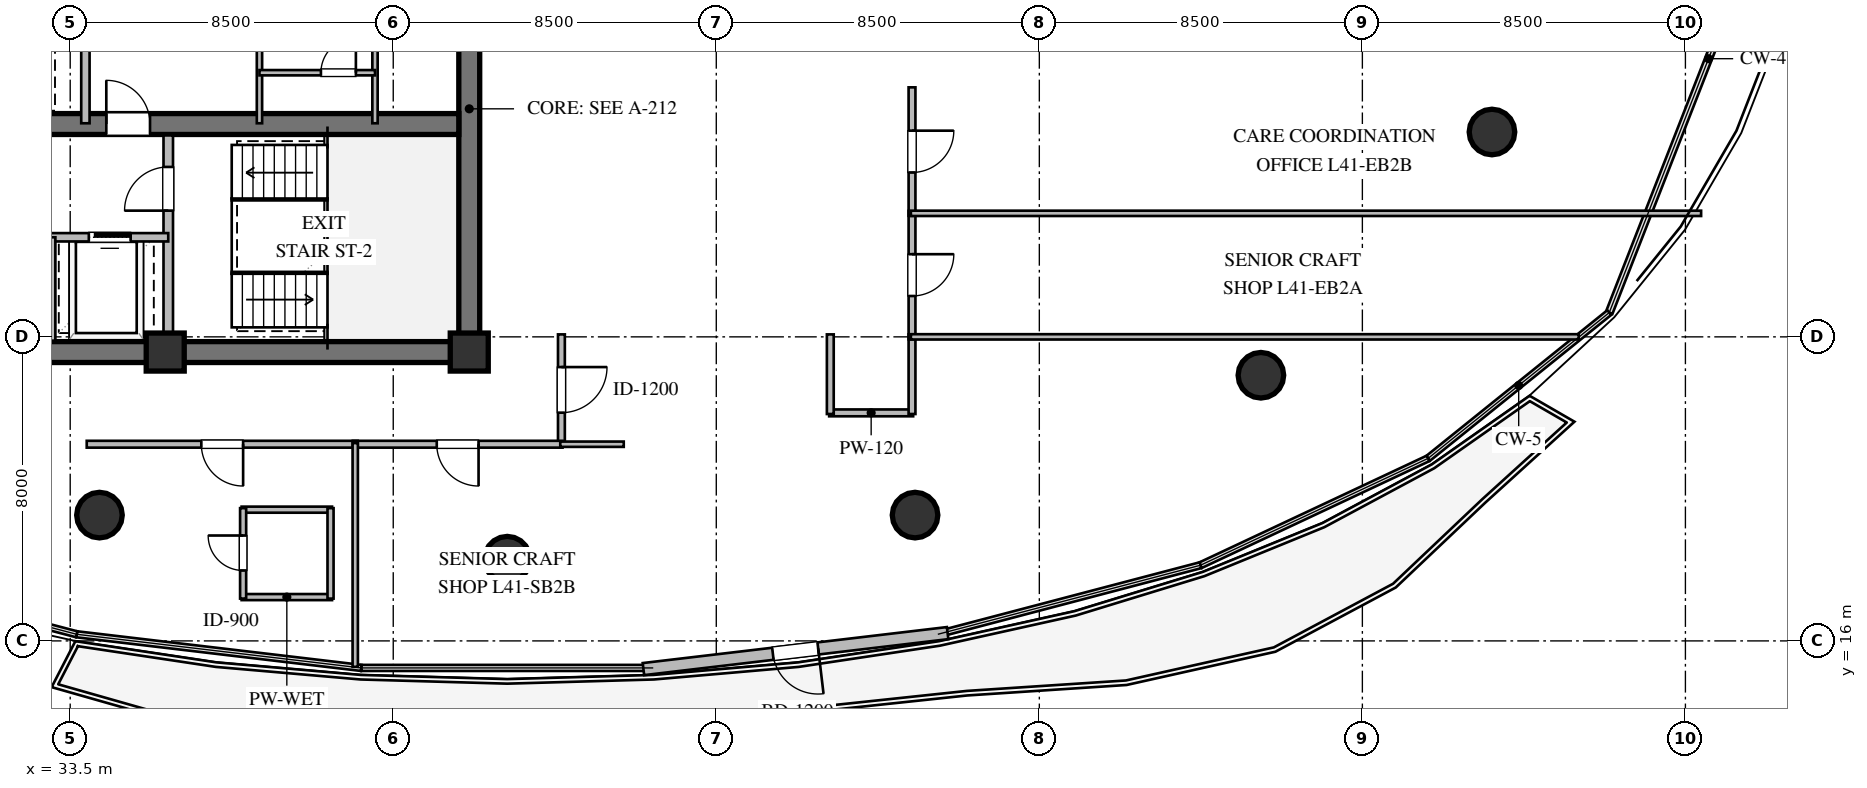
"""IFC4 building model, lengths in metres.
Left out: names, types, materials, properties, quantities, classifications, styles, units other than length and angle.
Written with IfcOpenShell. Run it as: python <this file> out.ifc"""

import sys

from ifc_helpers import new_model, si_unit, direction, frame, frame_2d, origin, origin_2d, place, context, subcontext, project, spatial, rectangle, circle, extrude, element, fill, save


model = new_model("IFC4")
c1 = context("Model", 3, precision=1e-05, world=origin(), true_north=direction((0.0, 1.0)))
c2 = subcontext(c1, "Body", "Model", "MODEL_VIEW")
j1 = project(units=[si_unit("LENGTHUNIT", "METRE"), si_unit("PLANEANGLEUNIT", "RADIAN")], contexts=[c1])
p1 = place(None, origin())
s1 = spatial("IfcSite", under=j1, at=p1, CompositionType="ELEMENT")
p2 = place(p1, origin())
s2 = spatial("IfcBuilding", under=s1, at=p2, CompositionType="ELEMENT")
p3 = place(p2, frame((0.0, 0.0, 156.6)))
s3 = spatial("IfcBuildingStorey", under=s2, at=p3, CompositionType="ELEMENT", Elevation=156.6)
p4 = place(p3, frame((21.725, 23.6, 0.0), z_axis=(0.0, 0.0, 1.0), x_axis=(1.0, 0.0, 0.0)))
e1 = element("IfcWall", 1, at=p4, inside=s3, PredefinedType="SHEAR", context=c2, shape_type="SweptSolid", body=[
    extrude(rectangle(XDim=22.55, YDim=0.55, at=frame_2d((11.275, 0.0))), origin(), (0.0, 0.0, 1.0), 3.36),
])
p5 = place(p3, frame((44.0, 23.875, 0.0), z_axis=(0.0, 0.0, 1.0), x_axis=(0.0, 1.0, 0.0)))
e2 = element("IfcWall", 2, at=p5, inside=s3, PredefinedType="SHEAR", context=c2, shape_type="SweptSolid", body=[
    extrude(rectangle(XDim=12.25, YDim=0.55, at=frame_2d((6.125, 0.0))), origin(), (0.0, 0.0, 1.0), 3.36),
])
p6 = place(p5, frame((8.725, 0.0, 0.0)))
e3 = element("IfcOpeningElement", 3, at=p6, cuts=e2, PredefinedType="OPENING", context=c2, shape_type="SweptSolid", body=[
    extrude(rectangle(XDim=1.5, YDim=2.15, at=frame_2d((0.75, 1.075))), frame((0.0, 0.285, 0.0), z_axis=(0.0, -1.0, 0.0), x_axis=(1.0, 0.0, 0.0)), (0.0, 0.0, 1.0), 0.57),
])
p7 = place(p3, frame((22.275, 29.6, 0.0), z_axis=(0.0, 0.0, 1.0), x_axis=(1.0, 0.0, 0.0)))
e4 = element("IfcWall", 4, at=p7, inside=s3, PredefinedType="SHEAR", context=c2, shape_type="SweptSolid", body=[
    extrude(rectangle(XDim=21.45, YDim=0.55, at=frame_2d((10.725, 0.0))), origin(), (0.0, 0.0, 1.0), 3.36),
])
p8 = place(p7, frame((12.175, 0.0, 0.0)))
e5 = element("IfcOpeningElement", 5, at=p8, cuts=e4, PredefinedType="OPENING", context=c2, shape_type="SweptSolid", body=[
    extrude(rectangle(XDim=1.15, YDim=2.1, at=frame_2d((0.575, 1.05))), frame((0.0, 0.285, 0.0), z_axis=(0.0, -1.0, 0.0), x_axis=(1.0, 0.0, 0.0)), (0.0, 0.0, 1.0), 0.57),
])
for number, where, z_axis, x_axis in (
    (6, (36.0, 23.6, 0.0), (0.0, 0.0, 1.0), (1.0, 0.0, 0.0)),
    (7, (44.0, 23.6, 0.0), (0.0, 0.0, 1.0), (1.0, 0.0, 0.0)),
):
    element("IfcColumn", number, at=place(p3, frame(where, z_axis=z_axis, x_axis=x_axis)), inside=s3, PredefinedType="COLUMN", context=c2, shape_type="SweptSolid", body=[
        extrude(rectangle(XDim=1.0, YDim=1.0, at=origin_2d()), origin(), (0.0, 0.0, 1.0), 3.6),
    ])
for number, where, z_axis, x_axis in (
    (8, (34.27, 19.31, 0.0), (0.0, 0.0, 1.0), (1.0, 0.0, 0.0)),
    (9, (45.0, 18.15, 0.0), (0.0, 0.0, 1.0), (1.0, 0.0, 0.0)),
    (10, (55.73, 19.31, 0.0), (0.0, 0.0, 1.0), (1.0, 0.0, 0.0)),
    (11, (64.83, 22.99, 0.0), (0.0, 0.0, 1.0), (1.0, 0.0, 0.0)),
    (12, (70.91, 29.39, 0.0), (0.0, 0.0, 1.0), (1.0, 0.0, 0.0)),
):
    element("IfcColumn", number, at=place(p3, frame(where, z_axis=z_axis, x_axis=x_axis)), inside=s3, PredefinedType="COLUMN", context=c2, shape_type="SweptSolid", body=[
        extrude(circle(Radius=0.6, at=origin_2d()), origin(), (0.0, 0.0, 1.0), 3.6),
    ])
p9 = place(p3, frame((56.587, 16.205, 0.0), z_axis=(0.0, 0.0, 1.0), x_axis=(-0.993072847957, -0.117500292131, 0.0)))
e13 = element("IfcWall", 13, at=p9, inside=s3, PredefinedType="STANDARD", context=c2, shape_type="SweptSolid", body=[
    extrude(rectangle(XDim=8.06, YDim=0.32, at=frame_2d((4.03, 0.0))), origin(), (0.0, 0.0, 1.0), 3.36),
])
p10 = place(p9, frame((3.43, 0.0, 0.0)))
e14 = element("IfcOpeningElement", 14, at=p10, cuts=e13, PredefinedType="OPENING", context=c2, shape_type="SweptSolid", body=[
    extrude(rectangle(XDim=1.2, YDim=2.15, at=frame_2d((0.6, 1.075))), frame((0.0, 0.17, 0.0), z_axis=(0.0, -1.0, 0.0), x_axis=(1.0, 0.0, 0.0)), (0.0, 0.0, 1.0), 0.34),
])
p11 = place(p3, frame((36.08, 23.9, 0.0), z_axis=(0.0, 0.0, 1.0), x_axis=(0.0, 1.0, 0.0)))
e15 = element("IfcWall", 15, at=p11, inside=s3, PredefinedType="SOLIDWALL", context=c2, shape_type="SweptSolid", body=[
    extrude(rectangle(XDim=5.4, YDim=0.25, at=frame_2d((2.7, 0.0))), origin(), (0.0, 0.0, 1.0), 3.36),
])
p12 = place(p11, frame((3.421, 0.0, 0.0)))
e16 = element("IfcOpeningElement", 16, at=p12, cuts=e15, PredefinedType="OPENING", context=c2, shape_type="SweptSolid", body=[
    extrude(rectangle(XDim=1.15, YDim=2.1, at=frame_2d((0.575, 1.05))), frame((0.0, 0.135, 0.0), z_axis=(0.0, -1.0, 0.0), x_axis=(1.0, 0.0, 0.0)), (0.0, 0.0, 1.0), 0.27),
])
p13 = place(p3, frame((29.92, 26.62, 0.0), z_axis=(0.0, 0.0, 1.0), x_axis=(1.0, 0.0, 0.0)))
e17 = element("IfcWall", 17, at=p13, inside=s3, PredefinedType="SOLIDWALL", context=c2, shape_type="SweptSolid", body=[
    extrude(rectangle(XDim=6.16, YDim=0.22, at=frame_2d((3.08, 0.0))), origin(), (0.0, 0.0, 1.0), 3.36),
])
p14 = place(p13, frame((0.99, 0.0, 0.0)))
e18 = element("IfcOpeningElement", 18, at=p14, cuts=e17, PredefinedType="OPENING", context=c2, shape_type="SweptSolid", body=[
    extrude(rectangle(XDim=1.1, YDim=2.1, at=frame_2d((0.55, 1.05))), frame((0.0, 0.12, 0.0), z_axis=(0.0, -1.0, 0.0), x_axis=(1.0, 0.0, 0.0)), (0.0, 0.0, 1.0), 0.24),
])
p15 = place(p13, frame((4.07, 0.0, 0.0)))
e19 = element("IfcOpeningElement", 19, at=p15, cuts=e17, PredefinedType="OPENING", context=c2, shape_type="SweptSolid", body=[
    extrude(rectangle(XDim=1.1, YDim=2.1, at=frame_2d((0.55, 1.05))), frame((0.0, 0.12, 0.0), z_axis=(0.0, -1.0, 0.0), x_axis=(1.0, 0.0, 0.0)), (0.0, 0.0, 1.0), 0.24),
])
p16 = place(p3, frame((33.0, 23.9, 0.0), z_axis=(0.0, 0.0, 1.0), x_axis=(0.0, 1.0, 0.0)))
e20 = element("IfcWall", 20, at=p16, inside=s3, PredefinedType="SOLIDWALL", context=c2, shape_type="SweptSolid", body=[
    extrude(rectangle(XDim=2.72, YDim=0.22, at=frame_2d((1.36, 0.0))), origin(), (0.0, 0.0, 1.0), 3.36),
])
p17 = place(p3, frame((33.9, 29.62, 0.0), z_axis=(0.0, 0.0, 1.0), x_axis=(0.0, 1.0, 0.0)))
e21 = element("IfcWall", 21, at=p17, inside=s3, PredefinedType="SOLIDWALL", context=c2, shape_type="SweptSolid", body=[
    extrude(rectangle(XDim=2.36, YDim=0.22, at=frame_2d((1.18, 0.0))), origin(), (0.0, 0.0, 1.0), 3.36),
])
for number, where, z_axis, x_axis in (
    (22, (38.48, 29.62, 0.0), (0.0, 0.0, 1.0), (0.0, 1.0, 0.0)),
    (23, (41.52, 29.62, 0.0), (0.0, 0.0, 1.0), (0.0, 1.0, 0.0)),
):
    element("IfcWall", number, at=place(p3, frame(where, z_axis=z_axis, x_axis=x_axis)), inside=s3, PredefinedType="PARTITIONING", context=c2, shape_type="SweptSolid", body=[
        extrude(rectangle(XDim=2.36, YDim=0.14, at=frame_2d((1.18, 0.0))), origin(), (0.0, 0.0, 1.0), 3.36),
    ])
p18 = place(p3, frame((38.48, 30.95, 0.0), z_axis=(0.0, 0.0, 1.0), x_axis=(1.0, 0.0, 0.0)))
e24 = element("IfcWall", 24, at=p18, inside=s3, PredefinedType="PARTITIONING", context=c2, shape_type="SweptSolid", body=[
    extrude(rectangle(XDim=3.04, YDim=0.14, at=frame_2d((1.52, 0.0))), origin(), (0.0, 0.0, 1.0), 3.36),
])
p19 = place(p18, frame((1.617, 0.0, 0.0)))
e25 = element("IfcOpeningElement", 25, at=p19, cuts=e24, PredefinedType="OPENING", context=c2, shape_type="SweptSolid", body=[
    extrude(rectangle(XDim=0.92, YDim=2.1, at=frame_2d((0.46, 1.05))), frame((0.0, 0.08, 0.0), z_axis=(0.0, -1.0, 0.0), x_axis=(1.0, 0.0, 0.0)), (0.0, 0.0, 1.0), 0.16),
])
p20 = place(p3, frame((38.01, 17.153, 0.0), z_axis=(0.0, 0.0, 1.0), x_axis=(1.0, 0.0, 0.0)))
e26 = element("IfcWall", 26, at=p20, inside=s3, PredefinedType="PLUMBINGWALL", context=c2, shape_type="SweptSolid", body=[
    extrude(rectangle(XDim=2.38, YDim=0.16, at=frame_2d((1.19, 0.0))), origin(), (0.0, 0.0, 1.0), 3.36),
])
p21 = place(p3, frame((38.01, 19.453, 0.0), z_axis=(0.0, 0.0, 1.0), x_axis=(1.0, 0.0, 0.0)))
e27 = element("IfcWall", 27, at=p21, inside=s3, PredefinedType="PLUMBINGWALL", context=c2, shape_type="SweptSolid", body=[
    extrude(rectangle(XDim=2.38, YDim=0.16, at=frame_2d((1.19, 0.0))), origin(), (0.0, 0.0, 1.0), 2.657),
])
p22 = place(p3, frame((38.05, 17.113, 0.0), z_axis=(0.0, 0.0, 1.0), x_axis=(0.0, 1.0, 0.0)))
e28 = element("IfcWall", 28, at=p22, inside=s3, PredefinedType="PLUMBINGWALL", context=c2, shape_type="SweptSolid", body=[
    extrude(rectangle(XDim=2.38, YDim=0.16, at=frame_2d((1.19, 0.0))), origin(), (0.0, 0.0, 1.0), 3.36),
])
p23 = place(p22, frame((0.74, 0.0, 0.0)))
e29 = element("IfcOpeningElement", 29, at=p23, cuts=e28, PredefinedType="OPENING", context=c2, shape_type="SweptSolid", body=[
    extrude(rectangle(XDim=0.92, YDim=2.1, at=frame_2d((0.46, 1.05))), frame((0.0, 0.09, 0.0), z_axis=(0.0, -1.0, 0.0), x_axis=(1.0, 0.0, 0.0)), (0.0, 0.0, 1.0), 0.18),
])
p24 = place(p3, frame((40.35, 17.113, 0.0), z_axis=(0.0, 0.0, 1.0), x_axis=(0.0, 1.0, 0.0)))
e30 = element("IfcWall", 30, at=p24, inside=s3, PredefinedType="PLUMBINGWALL", context=c2, shape_type="SweptSolid", body=[
    extrude(rectangle(XDim=2.38, YDim=0.16, at=frame_2d((1.19, 0.0))), origin(), (0.0, 0.0, 1.0), 3.36),
])
p25 = place(p3, frame((46.425, 24.065, 0.0), z_axis=(0.0, 0.0, 1.0), x_axis=(0.0, -1.0, 0.0)))
e31 = element("IfcWall", 31, at=p25, inside=s3, PredefinedType="PARTITIONING", context=c2, shape_type="SweptSolid", body=[
    extrude(rectangle(XDim=2.92, YDim=0.18, at=frame_2d((1.46, 0.0))), origin(), (0.0, 0.0, 1.0), 3.36),
])
p26 = place(p25, frame((0.86, 0.0, 0.0)))
e32 = element("IfcOpeningElement", 32, at=p26, cuts=e31, PredefinedType="OPENING", context=c2, shape_type="SweptSolid", body=[
    extrude(rectangle(XDim=1.2, YDim=2.15, at=frame_2d((0.6, 1.075))), frame((0.0, 0.1, 0.0), z_axis=(0.0, -1.0, 0.0), x_axis=(1.0, 0.0, 0.0)), (0.0, 0.0, 1.0), 0.2),
])
p27 = place(p3, frame((55.68, 22.0, 0.0), z_axis=(0.0, 0.0, 1.0), x_axis=(-1.0, 0.0, 0.0)))
e33 = element("IfcWall", 33, at=p27, inside=s3, PredefinedType="PARTITIONING", context=c2, shape_type="SweptSolid", body=[
    extrude(rectangle(XDim=2.21, YDim=0.18, at=frame_2d((1.105, 0.0))), origin(), (0.0, 0.0, 1.0), 3.36),
])
for number, where, z_axis, x_axis in (
    (34, (55.65, 24.065, 0.0), (0.0, 0.0, 1.0), (0.0, -1.0, 0.0)),
    (35, (53.5, 21.97, 0.0), (0.0, 0.0, 1.0), (0.0, 1.0, 0.0)),
):
    element("IfcWall", number, at=place(p3, frame(where, z_axis=z_axis, x_axis=x_axis)), inside=s3, PredefinedType="PARTITIONING", context=c2, shape_type="SweptSolid", body=[
        extrude(rectangle(XDim=2.095, YDim=0.18, at=frame_2d((1.047, 0.0))), origin(), (0.0, 0.0, 1.0), 3.36),
    ])
p28 = place(p3, frame((55.65, 27.315, 0.0), z_axis=(0.0, 0.0, 1.0), x_axis=(0.0, -1.0, 0.0)))
e36 = element("IfcWall", 36, at=p28, inside=s3, PredefinedType="PARTITIONING", context=c2, shape_type="SweptSolid", body=[
    extrude(rectangle(XDim=3.38, YDim=0.18, at=frame_2d((1.69, 0.0))), origin(), (0.0, 0.0, 1.0), 3.36),
])
p29 = place(p28, frame((1.14, 0.0, 0.0)))
e37 = element("IfcOpeningElement", 37, at=p29, cuts=e36, PredefinedType="OPENING", context=c2, shape_type="SweptSolid", body=[
    extrude(rectangle(XDim=1.1, YDim=2.1, at=frame_2d((0.55, 1.05))), frame((0.0, 0.1, 0.0), z_axis=(0.0, -1.0, 0.0), x_axis=(1.0, 0.0, 0.0)), (0.0, 0.0, 1.0), 0.2),
])
p30 = place(p3, frame((55.65, 30.565, 0.0), z_axis=(0.0, 0.0, 1.0), x_axis=(0.0, -1.0, 0.0)))
e38 = element("IfcWall", 38, at=p30, inside=s3, PredefinedType="PARTITIONING", context=c2, shape_type="SweptSolid", body=[
    extrude(rectangle(XDim=3.38, YDim=0.18, at=frame_2d((1.69, 0.0))), origin(), (0.0, 0.0, 1.0), 3.36),
])
p31 = place(p30, frame((1.14, 0.0, 0.0)))
e39 = element("IfcOpeningElement", 39, at=p31, cuts=e38, PredefinedType="OPENING", context=c2, shape_type="SweptSolid", body=[
    extrude(rectangle(XDim=1.1, YDim=2.1, at=frame_2d((0.55, 1.05))), frame((0.0, 0.1, 0.0), z_axis=(0.0, -1.0, 0.0), x_axis=(1.0, 0.0, 0.0)), (0.0, 0.0, 1.0), 0.2),
])
p32 = place(p3, frame((41.065, 21.175, 0.0), z_axis=(0.0, 0.0, 1.0), x_axis=(-1.0, 0.0, 0.0)))
e40 = element("IfcWall", 40, at=p32, inside=s3, PredefinedType="PARTITIONING", context=c2, shape_type="SweptSolid", body=[
    extrude(rectangle(XDim=7.13, YDim=0.18, at=frame_2d((3.565, 0.0))), origin(), (0.0, 0.0, 1.0), 2.996),
])
p33 = place(p32, frame((3.015, 0.0, 0.0)))
e41 = element("IfcOpeningElement", 41, at=p33, cuts=e40, PredefinedType="OPENING", context=c2, shape_type="SweptSolid", body=[
    extrude(rectangle(XDim=1.1, YDim=2.1, at=frame_2d((0.55, 1.05))), frame((0.0, 0.1, 0.0), z_axis=(0.0, -1.0, 0.0), x_axis=(1.0, 0.0, 0.0)), (0.0, 0.0, 1.0), 0.2),
])
p34 = place(p3, frame((46.455, 21.175, 0.0), z_axis=(0.0, 0.0, 1.0), x_axis=(-1.0, 0.0, 0.0)))
e42 = element("IfcWall", 42, at=p34, inside=s3, PredefinedType="PARTITIONING", context=c2, shape_type="SweptSolid", body=[
    extrude(rectangle(XDim=5.52, YDim=0.18, at=frame_2d((2.76, 0.0))), origin(), (0.0, 0.0, 1.0), 2.996),
])
p35 = place(p34, frame((2.21, 0.0, 0.0)))
e43 = element("IfcOpeningElement", 43, at=p35, cuts=e42, PredefinedType="OPENING", context=c2, shape_type="SweptSolid", body=[
    extrude(rectangle(XDim=1.1, YDim=2.1, at=frame_2d((0.55, 1.05))), frame((0.0, 0.1, 0.0), z_axis=(0.0, -1.0, 0.0), x_axis=(1.0, 0.0, 0.0)), (0.0, 0.0, 1.0), 0.2),
])
p36 = place(p3, frame((55.62, 24.0, 0.0), z_axis=(0.0, 0.0, 1.0), x_axis=(1.0, 0.0, 0.0)))
e44 = element("IfcWall", 44, at=p36, inside=s3, PredefinedType="PARTITIONING", context=c2, shape_type="SweptSolid", body=[
    extrude(rectangle(XDim=17.573, YDim=0.14, at=frame_2d((8.787, 0.0))), origin(), (0.0, 0.0, 1.0), 3.36),
])
p37 = place(p3, frame((48.065, 21.175, 0.0), z_axis=(0.0, 0.0, 1.0), x_axis=(-1.0, 0.0, 0.0)))
e45 = element("IfcWall", 45, at=p37, inside=s3, PredefinedType="PARTITIONING", context=c2, shape_type="SweptSolid", body=[
    extrude(rectangle(XDim=1.67, YDim=0.14, at=frame_2d((0.835, 0.0))), origin(), (0.0, 0.0, 1.0), 2.996),
])
p38 = place(p3, frame((55.62, 27.25, 0.0), z_axis=(0.0, 0.0, 1.0), x_axis=(1.0, 0.0, 0.0)))
e46 = element("IfcWall", 46, at=p38, inside=s3, PredefinedType="PARTITIONING", context=c2, shape_type="SweptSolid", body=[
    extrude(rectangle(XDim=20.793, YDim=0.14, at=frame_2d((10.396, 0.0))), origin(), (0.0, 0.0, 1.0), 2.89),
])
p39 = place(p3, frame((41.0, 21.205, 0.0), z_axis=(0.0, 0.0, 1.0), x_axis=(0.0, -1.0, 0.0)))
e47 = element("IfcWall", 47, at=p39, inside=s3, PredefinedType="PARTITIONING", context=c2, shape_type="SweptSolid", body=[
    extrude(rectangle(XDim=5.887, YDim=0.14, at=frame_2d((2.944, 0.0))), origin(), (0.0, 0.0, 1.0), 3.36),
])
p40 = place(p10, origin())
e48 = element("IfcDoor", 48, at=p40, inside=s3, OperationType="SINGLE_SWING_LEFT", PredefinedType="DOOR", context=c2, shape_type="SweptSolid", body=[
    extrude(rectangle(XDim=1.2, YDim=2.15, at=frame_2d((0.6, 1.075))), frame((0.0, 0.025, 0.0), z_axis=(0.0, -1.0, 0.0), x_axis=(1.0, 0.0, 0.0)), (0.0, 0.0, 1.0), 0.05),
])
fill(e14, e48)
p41 = place(p12, origin())
e49 = element("IfcDoor", 49, at=p41, inside=s3, OperationType="SINGLE_SWING_LEFT", PredefinedType="DOOR", context=c2, shape_type="SweptSolid", body=[
    extrude(rectangle(XDim=1.15, YDim=2.1, at=frame_2d((0.575, 1.05))), frame((0.0, 0.025, 0.0), z_axis=(0.0, -1.0, 0.0), x_axis=(1.0, 0.0, 0.0)), (0.0, 0.0, 1.0), 0.05),
])
fill(e16, e49)
p42 = place(p15, origin())
e50 = element("IfcDoor", 50, at=p42, inside=s3, OperationType="SLIDING_TO_RIGHT", PredefinedType="DOOR", context=c2, shape_type="SweptSolid", body=[
    extrude(rectangle(XDim=1.1, YDim=2.1, at=frame_2d((0.55, 1.05))), frame((0.0, 0.025, 0.0), z_axis=(0.0, -1.0, 0.0), x_axis=(1.0, 0.0, 0.0)), (0.0, 0.0, 1.0), 0.05),
])
fill(e19, e50)
p43 = place(p8, origin())
e51 = element("IfcDoor", 51, at=p43, inside=s3, OperationType="SINGLE_SWING_LEFT", PredefinedType="DOOR", context=c2, shape_type="SweptSolid", body=[
    extrude(rectangle(XDim=1.15, YDim=2.1, at=frame_2d((0.575, 1.05))), frame((0.0, 0.025, 0.0), z_axis=(0.0, -1.0, 0.0), x_axis=(1.0, 0.0, 0.0)), (0.0, 0.0, 1.0), 0.05),
])
fill(e5, e51)
p44 = place(p19, origin())
e52 = element("IfcDoor", 52, at=p44, inside=s3, OperationType="SINGLE_SWING_RIGHT", PredefinedType="DOOR", context=c2, shape_type="SweptSolid", body=[
    extrude(rectangle(XDim=0.92, YDim=2.1, at=frame_2d((0.46, 1.05))), frame((0.0, 0.025, 0.0), z_axis=(0.0, -1.0, 0.0), x_axis=(1.0, 0.0, 0.0)), (0.0, 0.0, 1.0), 0.05),
])
fill(e25, e52)
p45 = place(p23, origin())
e53 = element("IfcDoor", 53, at=p45, inside=s3, OperationType="SINGLE_SWING_RIGHT", PredefinedType="DOOR", context=c2, shape_type="SweptSolid", body=[
    extrude(rectangle(XDim=0.92, YDim=2.1, at=frame_2d((0.46, 1.05))), frame((0.0, 0.025, 0.0), z_axis=(0.0, -1.0, 0.0), x_axis=(1.0, 0.0, 0.0)), (0.0, 0.0, 1.0), 0.05),
])
fill(e29, e53)
p46 = place(p26, origin())
e54 = element("IfcDoor", 54, at=p46, inside=s3, OperationType="SINGLE_SWING_LEFT", PredefinedType="DOOR", context=c2, shape_type="SweptSolid", body=[
    extrude(rectangle(XDim=1.2, YDim=2.15, at=frame_2d((0.6, 1.075))), frame((0.0, 0.025, 0.0), z_axis=(0.0, -1.0, 0.0), x_axis=(1.0, 0.0, 0.0)), (0.0, 0.0, 1.0), 0.05),
])
fill(e32, e54)
p47 = place(p29, origin())
e55 = element("IfcDoor", 55, at=p47, inside=s3, OperationType="SINGLE_SWING_LEFT", PredefinedType="DOOR", context=c2, shape_type="SweptSolid", body=[
    extrude(rectangle(XDim=1.1, YDim=2.1, at=frame_2d((0.55, 1.05))), frame((0.0, 0.025, 0.0), z_axis=(0.0, -1.0, 0.0), x_axis=(1.0, 0.0, 0.0)), (0.0, 0.0, 1.0), 0.05),
])
fill(e37, e55)
p48 = place(p31, origin())
e56 = element("IfcDoor", 56, at=p48, inside=s3, OperationType="SINGLE_SWING_LEFT", PredefinedType="DOOR", context=c2, shape_type="SweptSolid", body=[
    extrude(rectangle(XDim=1.1, YDim=2.1, at=frame_2d((0.55, 1.05))), frame((0.0, 0.025, 0.0), z_axis=(0.0, -1.0, 0.0), x_axis=(1.0, 0.0, 0.0)), (0.0, 0.0, 1.0), 0.05),
])
fill(e39, e56)
p49 = place(p33, origin())
e57 = element("IfcDoor", 57, at=p49, inside=s3, OperationType="SINGLE_SWING_LEFT", PredefinedType="DOOR", context=c2, shape_type="SweptSolid", body=[
    extrude(rectangle(XDim=1.1, YDim=2.1, at=frame_2d((0.55, 1.05))), frame((0.0, 0.025, 0.0), z_axis=(0.0, -1.0, 0.0), x_axis=(1.0, 0.0, 0.0)), (0.0, 0.0, 1.0), 0.05),
])
fill(e41, e57)
p50 = place(p35, origin())
e58 = element("IfcDoor", 58, at=p50, inside=s3, OperationType="SINGLE_SWING_LEFT", PredefinedType="DOOR", context=c2, shape_type="SweptSolid", body=[
    extrude(rectangle(XDim=1.1, YDim=2.1, at=frame_2d((0.55, 1.05))), frame((0.0, 0.025, 0.0), z_axis=(0.0, -1.0, 0.0), x_axis=(1.0, 0.0, 0.0)), (0.0, 0.0, 1.0), 0.05),
])
fill(e43, e58)
save(model, sys.argv[1])
